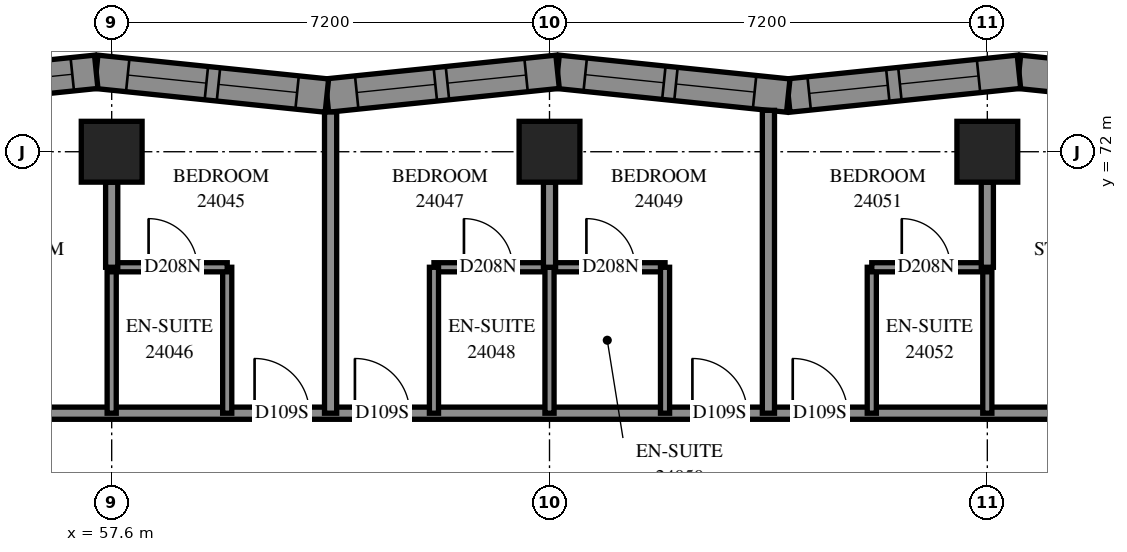
"""IFC4 building model, lengths in metres.
Left out: names, types, materials, properties, quantities, classifications, styles, units other than length and angle.
Written with IfcOpenShell. Run it as: python <this file> out.ifc"""

import sys

from ifc_helpers import new_model, si_unit, direction, frame, frame_2d, origin, origin_2d, place, context, subcontext, project, spatial, polyline, rectangle, outline, extrude, element, fill, save


model = new_model("IFC4")
c1 = context("Model", 3, precision=1e-05, world=origin(), true_north=direction((0.0, 1.0)))
c2 = subcontext(c1, "Body", "Model", "MODEL_VIEW")
j1 = project(units=[si_unit("LENGTHUNIT", "METRE"), si_unit("PLANEANGLEUNIT", "RADIAN")], contexts=[c1])
p1 = place(None, origin())
s1 = spatial("IfcSite", under=j1, at=p1, CompositionType="ELEMENT")
p2 = place(p1, origin())
s2 = spatial("IfcBuilding", under=s1, at=p2, CompositionType="ELEMENT")
p3 = place(p2, frame((0.0, 0.0, 91.4)))
s3 = spatial("IfcBuildingStorey", under=s2, at=p3, CompositionType="ELEMENT", Elevation=91.4)
for number, where, z_axis, x_axis in (
    (1, (57.6, 72.0, 0.0), (0.0, 0.0, 1.0), (1.0, 0.0, 0.0)),
    (2, (64.8, 72.0, 0.0), (0.0, 0.0, 1.0), (1.0, 0.0, 0.0)),
    (3, (72.0, 72.0, 0.0), (0.0, 0.0, 1.0), (1.0, 0.0, 0.0)),
):
    element("IfcColumn", number, at=place(p3, frame(where, z_axis=z_axis, x_axis=x_axis)), inside=s3, PredefinedType="COLUMN", context=c2, shape_type="SweptSolid", body=[
        extrude(rectangle(XDim=1.0, YDim=1.0, at=origin_2d()), origin(), (0.0, 0.0, 1.0), 3.1),
    ])
p4 = place(p3, frame((76.335, 72.921, 0.0), z_axis=(0.0, 0.0, 1.0), x_axis=(-0.9947305582, 0.1025237367, 0.0)))
e4 = element("IfcWall", 4, at=p4, inside=s3, PredefinedType="SOLIDWALL", context=c2, shape_type="SweptSolid", body=[
    extrude(outline(polyline([(0.05, -0.275), (3.864, -0.275), (3.807, 0.275), (-0.05, 0.275), (0.05, -0.275)])), origin(), (0.0, 0.0, 1.0), 3.1),
])
p5 = place(p4, frame((1.573, 0.0, 0.5)))
e5 = element("IfcOpeningElement", 5, at=p5, cuts=e4, PredefinedType="OPENING", context=c2, shape_type="SweptSolid", body=[
    extrude(rectangle(XDim=1.2, YDim=2.45, at=frame_2d((0.6, 1.225))), frame((0.0, 0.285, 0.0), z_axis=(0.0, -1.0, 0.0), x_axis=(1.0, 0.0, 0.0)), (0.0, 0.0, 1.0), 0.57),
])
p6 = place(p3, frame((72.52, 73.314, 0.0), z_axis=(0.0, 0.0, 1.0), x_axis=(-0.9947306832, -0.1025225234, 0.0)))
e6 = element("IfcWall", 6, at=p6, inside=s3, PredefinedType="SOLIDWALL", context=c2, shape_type="SweptSolid", body=[
    extrude(outline(polyline([(-0.028, -0.275), (3.785, -0.275), (3.842, 0.275), (0.028, 0.275), (-0.028, -0.275)])), origin(), (0.0, 0.0, 1.0), 3.1),
])
p7 = place(p6, frame((0.668, 0.0, 0.5)))
e7 = element("IfcOpeningElement", 7, at=p7, cuts=e6, PredefinedType="OPENING", context=c2, shape_type="SweptSolid", body=[
    extrude(rectangle(XDim=1.3, YDim=2.45, at=frame_2d((0.65, 1.225))), frame((0.0, 0.285, 0.0), z_axis=(0.0, -1.0, 0.0), x_axis=(1.0, 0.0, 0.0)), (0.0, 0.0, 1.0), 0.57),
])
p8 = place(p6, frame((2.168, 0.0, 0.5)))
e8 = element("IfcOpeningElement", 8, at=p8, cuts=e6, PredefinedType="OPENING", context=c2, shape_type="SweptSolid", body=[
    extrude(rectangle(XDim=1.3, YDim=2.45, at=frame_2d((0.65, 1.225))), frame((0.0, 0.285, 0.0), z_axis=(0.0, -1.0, 0.0), x_axis=(1.0, 0.0, 0.0)), (0.0, 0.0, 1.0), 0.57),
])
p9 = place(p3, frame((68.727, 72.924, 0.0), z_axis=(0.0, 0.0, 1.0), x_axis=(-0.9947306832, 0.1025225234, 0.0)))
e9 = element("IfcWall", 9, at=p9, inside=s3, PredefinedType="SOLIDWALL", context=c2, shape_type="SweptSolid", body=[
    extrude(outline(polyline([(0.028, -0.275), (3.842, -0.275), (3.785, 0.275), (-0.028, 0.275), (0.028, -0.275)])), origin(), (0.0, 0.0, 1.0), 3.1),
])
p10 = place(p9, frame((0.557, 0.0, 0.5)))
e10 = element("IfcOpeningElement", 10, at=p10, cuts=e9, PredefinedType="OPENING", context=c2, shape_type="SweptSolid", body=[
    extrude(rectangle(XDim=1.3, YDim=2.45, at=frame_2d((0.65, 1.225))), frame((0.0, 0.285, 0.0), z_axis=(0.0, -1.0, 0.0), x_axis=(1.0, 0.0, 0.0)), (0.0, 0.0, 1.0), 0.57),
])
p11 = place(p9, frame((2.057, 0.0, 0.5)))
e11 = element("IfcOpeningElement", 11, at=p11, cuts=e9, PredefinedType="OPENING", context=c2, shape_type="SweptSolid", body=[
    extrude(rectangle(XDim=1.3, YDim=2.45, at=frame_2d((0.65, 1.225))), frame((0.0, 0.285, 0.0), z_axis=(0.0, -1.0, 0.0), x_axis=(1.0, 0.0, 0.0)), (0.0, 0.0, 1.0), 0.57),
])
p12 = place(p3, frame((64.933, 73.314, 0.0), z_axis=(0.0, 0.0, 1.0), x_axis=(-0.9947304076, -0.1025251975, 0.0)))
e12 = element("IfcWall", 12, at=p12, inside=s3, PredefinedType="SOLIDWALL", context=c2, shape_type="SweptSolid", body=[
    extrude(outline(polyline([(-0.028, -0.275), (3.785, -0.275), (3.842, 0.275), (0.028, 0.275), (-0.028, -0.275)])), origin(), (0.0, 0.0, 1.0), 3.1),
])
p13 = place(p12, frame((0.521, 0.0, 0.5)))
e13 = element("IfcOpeningElement", 13, at=p13, cuts=e12, PredefinedType="OPENING", context=c2, shape_type="SweptSolid", body=[
    extrude(rectangle(XDim=1.3, YDim=2.45, at=frame_2d((0.65, 1.225))), frame((0.0, 0.285, 0.0), z_axis=(0.0, -1.0, 0.0), x_axis=(1.0, 0.0, 0.0)), (0.0, 0.0, 1.0), 0.57),
])
p14 = place(p12, frame((2.021, 0.0, 0.5)))
e14 = element("IfcOpeningElement", 14, at=p14, cuts=e12, PredefinedType="OPENING", context=c2, shape_type="SweptSolid", body=[
    extrude(rectangle(XDim=1.3, YDim=2.45, at=frame_2d((0.65, 1.225))), frame((0.0, 0.285, 0.0), z_axis=(0.0, -1.0, 0.0), x_axis=(1.0, 0.0, 0.0)), (0.0, 0.0, 1.0), 0.57),
])
p15 = place(p3, frame((61.139, 72.924, 0.0), z_axis=(0.0, 0.0, 1.0), x_axis=(-0.9947306832, 0.1025225234, 0.0)))
e15 = element("IfcWall", 15, at=p15, inside=s3, PredefinedType="SOLIDWALL", context=c2, shape_type="SweptSolid", body=[
    extrude(outline(polyline([(0.028, -0.275), (3.842, -0.275), (3.785, 0.275), (-0.028, 0.275), (0.028, -0.275)])), origin(), (0.0, 0.0, 1.0), 3.1),
])
p16 = place(p15, frame((0.493, 0.0, 0.5)))
e16 = element("IfcOpeningElement", 16, at=p16, cuts=e15, PredefinedType="OPENING", context=c2, shape_type="SweptSolid", body=[
    extrude(rectangle(XDim=1.3, YDim=2.45, at=frame_2d((0.65, 1.225))), frame((0.0, 0.285, 0.0), z_axis=(0.0, -1.0, 0.0), x_axis=(1.0, 0.0, 0.0)), (0.0, 0.0, 1.0), 0.57),
])
p17 = place(p15, frame((1.993, 0.0, 0.5)))
e17 = element("IfcOpeningElement", 17, at=p17, cuts=e15, PredefinedType="OPENING", context=c2, shape_type="SweptSolid", body=[
    extrude(rectangle(XDim=1.3, YDim=2.45, at=frame_2d((0.65, 1.225))), frame((0.0, 0.285, 0.0), z_axis=(0.0, -1.0, 0.0), x_axis=(1.0, 0.0, 0.0)), (0.0, 0.0, 1.0), 0.57),
])
p18 = place(p3, frame((57.346, 73.314, 0.0), z_axis=(0.0, 0.0, 1.0), x_axis=(-0.9947304076, -0.1025251975, 0.0)))
e18 = element("IfcWall", 18, at=p18, inside=s3, PredefinedType="SOLIDWALL", context=c2, shape_type="SweptSolid", body=[
    extrude(outline(polyline([(-0.028, -0.275), (3.785, -0.275), (3.842, 0.275), (0.028, 0.275), (-0.028, -0.275)])), origin(), (0.0, 0.0, 1.0), 3.1),
])
p19 = place(p18, frame((0.396, 0.0, 0.5)))
e19 = element("IfcOpeningElement", 19, at=p19, cuts=e18, PredefinedType="OPENING", context=c2, shape_type="SweptSolid", body=[
    extrude(rectangle(XDim=1.3, YDim=2.45, at=frame_2d((0.65, 1.225))), frame((0.0, 0.285, 0.0), z_axis=(0.0, -1.0, 0.0), x_axis=(1.0, 0.0, 0.0)), (0.0, 0.0, 1.0), 0.57),
])
p20 = place(p18, frame((1.896, 0.0, 0.5)))
e20 = element("IfcOpeningElement", 20, at=p20, cuts=e18, PredefinedType="OPENING", context=c2, shape_type="SweptSolid", body=[
    extrude(rectangle(XDim=1.3, YDim=2.45, at=frame_2d((0.65, 1.225))), frame((0.0, 0.285, 0.0), z_axis=(0.0, -1.0, 0.0), x_axis=(1.0, 0.0, 0.0)), (0.0, 0.0, 1.0), 0.57),
])
p21 = place(p3, frame((54.7, 67.7, 0.0), z_axis=(0.0, 0.0, 1.0), x_axis=(1.0, 0.0, 0.0)))
e21 = element("IfcWall", 21, at=p21, inside=s3, PredefinedType="PARTITIONING", context=c2, shape_type="SweptSolid", body=[
    extrude(rectangle(XDim=20.2, YDim=0.2, at=frame_2d((10.1, 0.0))), origin(), (0.0, 0.0, 1.0), 3.1),
])
p22 = place(p21, frame((5.25, 0.0, 0.0)))
e22 = element("IfcOpeningElement", 22, at=p22, cuts=e21, PredefinedType="OPENING", context=c2, shape_type="SweptSolid", body=[
    extrude(rectangle(XDim=0.9, YDim=2.1, at=frame_2d((0.45, 1.05))), frame((0.0, 0.11, 0.0), z_axis=(0.0, -1.0, 0.0), x_axis=(1.0, 0.0, 0.0)), (0.0, 0.0, 1.0), 0.22),
])
p23 = place(p21, frame((6.9, 0.0, 0.0)))
e23 = element("IfcOpeningElement", 23, at=p23, cuts=e21, PredefinedType="OPENING", context=c2, shape_type="SweptSolid", body=[
    extrude(rectangle(XDim=0.9, YDim=2.1, at=frame_2d((0.45, 1.05))), frame((0.0, 0.11, 0.0), z_axis=(0.0, -1.0, 0.0), x_axis=(1.0, 0.0, 0.0)), (0.0, 0.0, 1.0), 0.22),
])
p24 = place(p21, frame((12.45, 0.0, 0.0)))
e24 = element("IfcOpeningElement", 24, at=p24, cuts=e21, PredefinedType="OPENING", context=c2, shape_type="SweptSolid", body=[
    extrude(rectangle(XDim=0.9, YDim=2.1, at=frame_2d((0.45, 1.05))), frame((0.0, 0.11, 0.0), z_axis=(0.0, -1.0, 0.0), x_axis=(1.0, 0.0, 0.0)), (0.0, 0.0, 1.0), 0.22),
])
p25 = place(p21, frame((14.1, 0.0, 0.0)))
e25 = element("IfcOpeningElement", 25, at=p25, cuts=e21, PredefinedType="OPENING", context=c2, shape_type="SweptSolid", body=[
    extrude(rectangle(XDim=0.9, YDim=2.1, at=frame_2d((0.45, 1.05))), frame((0.0, 0.11, 0.0), z_axis=(0.0, -1.0, 0.0), x_axis=(1.0, 0.0, 0.0)), (0.0, 0.0, 1.0), 0.22),
])
p26 = place(p3, frame((68.4, 67.7, 0.0), z_axis=(0.0, 0.0, 1.0), x_axis=(0.0, 1.0, 0.0)))
e26 = element("IfcWall", 26, at=p26, inside=s3, PredefinedType="PARTITIONING", context=c2, shape_type="SweptSolid", body=[
    extrude(rectangle(XDim=4.981, YDim=0.2, at=frame_2d((2.49, 0.0))), origin(), (0.0, 0.0, 1.0), 3.1),
])
p27 = place(p3, frame((61.2, 67.7, 0.0), z_axis=(0.0, 0.0, 1.0), x_axis=(0.0, 1.0, 0.0)))
e27 = element("IfcWall", 27, at=p27, inside=s3, PredefinedType="PARTITIONING", context=c2, shape_type="SweptSolid", body=[
    extrude(rectangle(XDim=4.953, YDim=0.2, at=frame_2d((2.477, 0.0))), origin(), (0.0, 0.0, 1.0), 3.1),
])
p28 = place(p3, frame((62.9, 70.1, 0.0), z_axis=(0.0, 0.0, 1.0), x_axis=(1.0, 0.0, 0.0)))
e28 = element("IfcWall", 28, at=p28, inside=s3, PredefinedType="PARTITIONING", context=c2, shape_type="SweptSolid", body=[
    extrude(rectangle(XDim=3.8, YDim=0.15, at=frame_2d((1.9, 0.0))), origin(), (0.0, 0.0, 1.0), 3.1),
])
p29 = place(p28, frame((0.493, 0.0, 0.0)))
e29 = element("IfcOpeningElement", 29, at=p29, cuts=e28, PredefinedType="OPENING", context=c2, shape_type="SweptSolid", body=[
    extrude(rectangle(XDim=0.8, YDim=2.1, at=frame_2d((0.4, 1.05))), frame((0.0, 0.085, 0.0), z_axis=(0.0, -1.0, 0.0), x_axis=(1.0, 0.0, 0.0)), (0.0, 0.0, 1.0), 0.17),
])
p30 = place(p28, frame((2.507, 0.0, 0.0)))
e30 = element("IfcOpeningElement", 30, at=p30, cuts=e28, PredefinedType="OPENING", context=c2, shape_type="SweptSolid", body=[
    extrude(rectangle(XDim=0.8, YDim=2.1, at=frame_2d((0.4, 1.05))), frame((0.0, 0.085, 0.0), z_axis=(0.0, -1.0, 0.0), x_axis=(1.0, 0.0, 0.0)), (0.0, 0.0, 1.0), 0.17),
])
for number, where, z_axis, x_axis in (
    (31, (59.5, 67.7, 0.0), (0.0, 0.0, 1.0), (0.0, 1.0, 0.0)),
    (32, (57.6, 67.7, 0.0), (0.0, 0.0, 1.0), (0.0, 1.0, 0.0)),
    (33, (62.9, 67.7, 0.0), (0.0, 0.0, 1.0), (0.0, 1.0, 0.0)),
    (34, (64.8, 67.7, 0.0), (0.0, 0.0, 1.0), (0.0, 1.0, 0.0)),
    (35, (66.7, 67.7, 0.0), (0.0, 0.0, 1.0), (0.0, 1.0, 0.0)),
    (36, (70.1, 67.7, 0.0), (0.0, 0.0, 1.0), (0.0, 1.0, 0.0)),
    (37, (72.0, 67.7, 0.0), (0.0, 0.0, 1.0), (0.0, 1.0, 0.0)),
):
    element("IfcWall", number, at=place(p3, frame(where, z_axis=z_axis, x_axis=x_axis)), inside=s3, PredefinedType="PARTITIONING", context=c2, shape_type="SweptSolid", body=[
        extrude(rectangle(XDim=2.4, YDim=0.15, at=frame_2d((1.2, 0.0))), origin(), (0.0, 0.0, 1.0), 3.1),
    ])
p31 = place(p3, frame((70.1, 70.1, 0.0), z_axis=(0.0, 0.0, 1.0), x_axis=(1.0, 0.0, 0.0)))
e38 = element("IfcWall", 38, at=p31, inside=s3, PredefinedType="PARTITIONING", context=c2, shape_type="SweptSolid", body=[
    extrude(rectangle(XDim=1.9, YDim=0.15, at=frame_2d((0.95, 0.0))), origin(), (0.0, 0.0, 1.0), 3.1),
])
p32 = place(p31, frame((0.493, 0.0, 0.0)))
e39 = element("IfcOpeningElement", 39, at=p32, cuts=e38, PredefinedType="OPENING", context=c2, shape_type="SweptSolid", body=[
    extrude(rectangle(XDim=0.8, YDim=2.1, at=frame_2d((0.4, 1.05))), frame((0.0, 0.085, 0.0), z_axis=(0.0, -1.0, 0.0), x_axis=(1.0, 0.0, 0.0)), (0.0, 0.0, 1.0), 0.17),
])
p33 = place(p3, frame((57.6, 70.1, 0.0), z_axis=(0.0, 0.0, 1.0), x_axis=(1.0, 0.0, 0.0)))
e40 = element("IfcWall", 40, at=p33, inside=s3, PredefinedType="PARTITIONING", context=c2, shape_type="SweptSolid", body=[
    extrude(rectangle(XDim=1.9, YDim=0.15, at=frame_2d((0.95, 0.0))), origin(), (0.0, 0.0, 1.0), 3.1),
])
p34 = place(p33, frame((0.607, 0.0, 0.0)))
e41 = element("IfcOpeningElement", 41, at=p34, cuts=e40, PredefinedType="OPENING", context=c2, shape_type="SweptSolid", body=[
    extrude(rectangle(XDim=0.8, YDim=2.1, at=frame_2d((0.4, 1.05))), frame((0.0, 0.085, 0.0), z_axis=(0.0, -1.0, 0.0), x_axis=(1.0, 0.0, 0.0)), (0.0, 0.0, 1.0), 0.17),
])
for number, where, z_axis, x_axis in (
    (42, (57.6, 70.1, 0.0), (0.0, 0.0, 1.0), (0.0, 1.0, 0.0)),
    (43, (64.8, 70.1, 0.0), (0.0, 0.0, 1.0), (0.0, 1.0, 0.0)),
    (44, (72.0, 70.1, 0.0), (0.0, 0.0, 1.0), (0.0, 1.0, 0.0)),
):
    element("IfcWall", number, at=place(p3, frame(where, z_axis=z_axis, x_axis=x_axis)), inside=s3, PredefinedType="PARTITIONING", context=c2, shape_type="SweptSolid", body=[
        extrude(rectangle(XDim=1.4, YDim=0.2, at=frame_2d((0.7, 0.0))), origin(), (0.0, 0.0, 1.0), 3.1),
    ])
p35 = place(p7, origin())
e45 = element("IfcWindow", 45, at=p35, inside=s3, PartitioningType="SINGLE_PANEL", PredefinedType="WINDOW", context=c2, shape_type="SweptSolid", body=[
    extrude(rectangle(XDim=1.3, YDim=2.45, at=frame_2d((0.65, 1.225))), frame((0.0, 0.155, 0.0), z_axis=(0.0, -1.0, 0.0), x_axis=(1.0, 0.0, 0.0)), (0.0, 0.0, 1.0), 0.06),
])
fill(e7, e45)
p36 = place(p8, origin())
e46 = element("IfcWindow", 46, at=p36, inside=s3, PartitioningType="SINGLE_PANEL", PredefinedType="WINDOW", context=c2, shape_type="SweptSolid", body=[
    extrude(rectangle(XDim=1.3, YDim=2.45, at=frame_2d((0.65, 1.225))), frame((0.0, 0.155, 0.0), z_axis=(0.0, -1.0, 0.0), x_axis=(1.0, 0.0, 0.0)), (0.0, 0.0, 1.0), 0.06),
])
fill(e8, e46)
p37 = place(p10, origin())
e47 = element("IfcWindow", 47, at=p37, inside=s3, PartitioningType="SINGLE_PANEL", PredefinedType="WINDOW", context=c2, shape_type="SweptSolid", body=[
    extrude(rectangle(XDim=1.3, YDim=2.45, at=frame_2d((0.65, 1.225))), frame((0.0, 0.155, 0.0), z_axis=(0.0, -1.0, 0.0), x_axis=(1.0, 0.0, 0.0)), (0.0, 0.0, 1.0), 0.06),
])
fill(e10, e47)
p38 = place(p11, origin())
e48 = element("IfcWindow", 48, at=p38, inside=s3, PartitioningType="SINGLE_PANEL", PredefinedType="WINDOW", context=c2, shape_type="SweptSolid", body=[
    extrude(rectangle(XDim=1.3, YDim=2.45, at=frame_2d((0.65, 1.225))), frame((0.0, 0.155, 0.0), z_axis=(0.0, -1.0, 0.0), x_axis=(1.0, 0.0, 0.0)), (0.0, 0.0, 1.0), 0.06),
])
fill(e11, e48)
p39 = place(p13, origin())
e49 = element("IfcWindow", 49, at=p39, inside=s3, PartitioningType="SINGLE_PANEL", PredefinedType="WINDOW", context=c2, shape_type="SweptSolid", body=[
    extrude(rectangle(XDim=1.3, YDim=2.45, at=frame_2d((0.65, 1.225))), frame((0.0, 0.155, 0.0), z_axis=(0.0, -1.0, 0.0), x_axis=(1.0, 0.0, 0.0)), (0.0, 0.0, 1.0), 0.06),
])
fill(e13, e49)
p40 = place(p14, origin())
e50 = element("IfcWindow", 50, at=p40, inside=s3, PartitioningType="SINGLE_PANEL", PredefinedType="WINDOW", context=c2, shape_type="SweptSolid", body=[
    extrude(rectangle(XDim=1.3, YDim=2.45, at=frame_2d((0.65, 1.225))), frame((0.0, 0.155, 0.0), z_axis=(0.0, -1.0, 0.0), x_axis=(1.0, 0.0, 0.0)), (0.0, 0.0, 1.0), 0.06),
])
fill(e14, e50)
p41 = place(p16, origin())
e51 = element("IfcWindow", 51, at=p41, inside=s3, PartitioningType="SINGLE_PANEL", PredefinedType="WINDOW", context=c2, shape_type="SweptSolid", body=[
    extrude(rectangle(XDim=1.3, YDim=2.45, at=frame_2d((0.65, 1.225))), frame((0.0, 0.155, 0.0), z_axis=(0.0, -1.0, 0.0), x_axis=(1.0, 0.0, 0.0)), (0.0, 0.0, 1.0), 0.06),
])
fill(e16, e51)
p42 = place(p17, origin())
e52 = element("IfcWindow", 52, at=p42, inside=s3, PartitioningType="SINGLE_PANEL", PredefinedType="WINDOW", context=c2, shape_type="SweptSolid", body=[
    extrude(rectangle(XDim=1.3, YDim=2.45, at=frame_2d((0.65, 1.225))), frame((0.0, 0.155, 0.0), z_axis=(0.0, -1.0, 0.0), x_axis=(1.0, 0.0, 0.0)), (0.0, 0.0, 1.0), 0.06),
])
fill(e17, e52)
p43 = place(p19, origin())
e53 = element("IfcWindow", 53, at=p43, inside=s3, PartitioningType="SINGLE_PANEL", PredefinedType="WINDOW", context=c2, shape_type="SweptSolid", body=[
    extrude(rectangle(XDim=1.3, YDim=2.45, at=frame_2d((0.65, 1.225))), frame((0.0, 0.155, 0.0), z_axis=(0.0, -1.0, 0.0), x_axis=(1.0, 0.0, 0.0)), (0.0, 0.0, 1.0), 0.06),
])
fill(e19, e53)
p44 = place(p22, origin())
e54 = element("IfcDoor", 54, at=p44, inside=s3, OperationType="SINGLE_SWING_RIGHT", PredefinedType="DOOR", context=c2, shape_type="SweptSolid", body=[
    extrude(rectangle(XDim=0.9, YDim=2.1, at=frame_2d((0.45, 1.05))), frame((0.0, 0.025, 0.0), z_axis=(0.0, -1.0, 0.0), x_axis=(1.0, 0.0, 0.0)), (0.0, 0.0, 1.0), 0.05),
])
fill(e22, e54)
p45 = place(p34, origin())
e55 = element("IfcDoor", 55, at=p45, inside=s3, OperationType="SINGLE_SWING_RIGHT", PredefinedType="DOOR", context=c2, shape_type="SweptSolid", body=[
    extrude(rectangle(XDim=0.8, YDim=2.1, at=frame_2d((0.4, 1.05))), frame((0.0, 0.025, 0.0), z_axis=(0.0, -1.0, 0.0), x_axis=(1.0, 0.0, 0.0)), (0.0, 0.0, 1.0), 0.05),
])
fill(e41, e55)
p46 = place(p23, origin())
e56 = element("IfcDoor", 56, at=p46, inside=s3, OperationType="SINGLE_SWING_LEFT", PredefinedType="DOOR", context=c2, shape_type="SweptSolid", body=[
    extrude(rectangle(XDim=0.9, YDim=2.1, at=frame_2d((0.45, 1.05))), frame((0.0, 0.025, 0.0), z_axis=(0.0, -1.0, 0.0), x_axis=(1.0, 0.0, 0.0)), (0.0, 0.0, 1.0), 0.05),
])
fill(e23, e56)
p47 = place(p29, origin())
e57 = element("IfcDoor", 57, at=p47, inside=s3, OperationType="SINGLE_SWING_RIGHT", PredefinedType="DOOR", context=c2, shape_type="SweptSolid", body=[
    extrude(rectangle(XDim=0.8, YDim=2.1, at=frame_2d((0.4, 1.05))), frame((0.0, 0.025, 0.0), z_axis=(0.0, -1.0, 0.0), x_axis=(1.0, 0.0, 0.0)), (0.0, 0.0, 1.0), 0.05),
])
fill(e29, e57)
p48 = place(p24, origin())
e58 = element("IfcDoor", 58, at=p48, inside=s3, OperationType="SINGLE_SWING_RIGHT", PredefinedType="DOOR", context=c2, shape_type="SweptSolid", body=[
    extrude(rectangle(XDim=0.9, YDim=2.1, at=frame_2d((0.45, 1.05))), frame((0.0, 0.025, 0.0), z_axis=(0.0, -1.0, 0.0), x_axis=(1.0, 0.0, 0.0)), (0.0, 0.0, 1.0), 0.05),
])
fill(e24, e58)
p49 = place(p30, origin())
e59 = element("IfcDoor", 59, at=p49, inside=s3, OperationType="SINGLE_SWING_RIGHT", PredefinedType="DOOR", context=c2, shape_type="SweptSolid", body=[
    extrude(rectangle(XDim=0.8, YDim=2.1, at=frame_2d((0.4, 1.05))), frame((0.0, 0.025, 0.0), z_axis=(0.0, -1.0, 0.0), x_axis=(1.0, 0.0, 0.0)), (0.0, 0.0, 1.0), 0.05),
])
fill(e30, e59)
p50 = place(p25, origin())
e60 = element("IfcDoor", 60, at=p50, inside=s3, OperationType="SINGLE_SWING_LEFT", PredefinedType="DOOR", context=c2, shape_type="SweptSolid", body=[
    extrude(rectangle(XDim=0.9, YDim=2.1, at=frame_2d((0.45, 1.05))), frame((0.0, 0.025, 0.0), z_axis=(0.0, -1.0, 0.0), x_axis=(1.0, 0.0, 0.0)), (0.0, 0.0, 1.0), 0.05),
])
fill(e25, e60)
p51 = place(p32, origin())
e61 = element("IfcDoor", 61, at=p51, inside=s3, OperationType="SINGLE_SWING_RIGHT", PredefinedType="DOOR", context=c2, shape_type="SweptSolid", body=[
    extrude(rectangle(XDim=0.8, YDim=2.1, at=frame_2d((0.4, 1.05))), frame((0.0, 0.025, 0.0), z_axis=(0.0, -1.0, 0.0), x_axis=(1.0, 0.0, 0.0)), (0.0, 0.0, 1.0), 0.05),
])
fill(e39, e61)
save(model, sys.argv[1])
